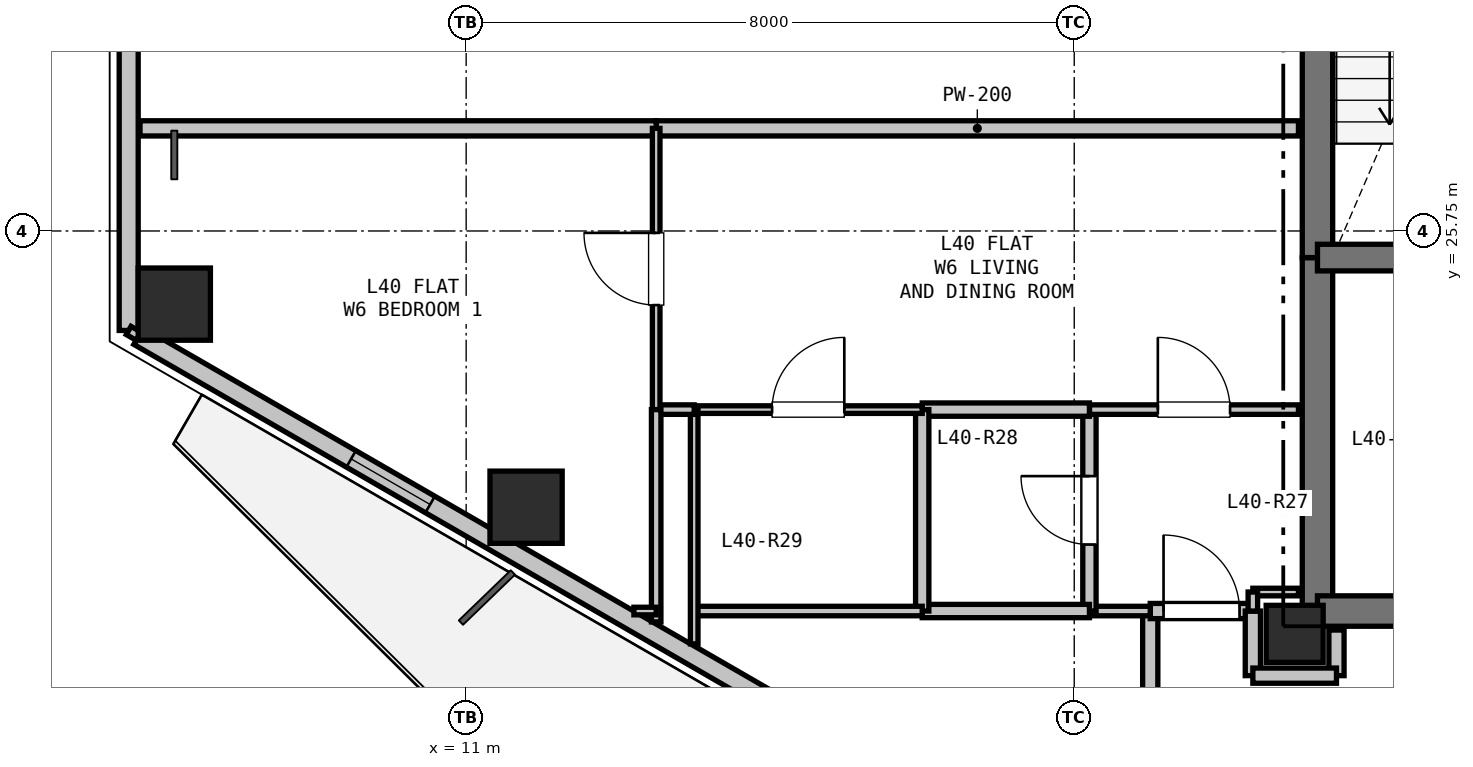
"""IFC4 building model, lengths in metres.
Left out: names, types, materials, properties, quantities, classifications, styles, units other than length and angle.
Written with IfcOpenShell. Run it as: python <this file> out.ifc"""

import sys

from ifc_helpers import new_model, si_unit, direction, frame, frame_2d, origin, origin_2d, place, context, subcontext, project, spatial, rectangle, hollow_rectangle, extrude, element, fill, save


model = new_model("IFC4")
c1 = context("Model", 3, precision=1e-05, world=origin(), true_north=direction((0.0, 1.0)))
c2 = subcontext(c1, "Body", "Model", "MODEL_VIEW")
j1 = project(units=[si_unit("LENGTHUNIT", "METRE"), si_unit("PLANEANGLEUNIT", "RADIAN")], contexts=[c1])
p1 = place(None, origin())
s1 = spatial("IfcSite", under=j1, at=p1, CompositionType="ELEMENT")
p2 = place(p1, origin())
s2 = spatial("IfcBuilding", under=s1, at=p2, CompositionType="ELEMENT")
p3 = place(p2, frame((0.0, 0.0, 144.3)))
s3 = spatial("IfcBuildingStorey", under=s2, at=p3, CompositionType="ELEMENT", Elevation=144.3)
p4 = place(p3, frame((21.9, 20.45, 0.0), z_axis=(0.0, 0.0, 1.0), x_axis=(1.0, 0.0, 0.0)))
e1 = element("IfcColumn", 1, at=p4, inside=s3, PredefinedType="COLUMN", context=c2, shape_type="SweptSolid", body=[
    extrude(rectangle(XDim=0.75, YDim=0.75, at=origin_2d()), origin(), (0.0, 0.0, 1.0), 3.3),
])
for number, where, z_axis, x_axis in (
    (2, (11.788, 22.116, 0.0), (0.0, 0.0, 1.0), (1.0, 0.0, 0.0)),
    (3, (7.16, 24.788, 0.0), (0.0, 0.0, 1.0), (1.0, 0.0, 0.0)),
):
    element("IfcColumn", number, at=place(p3, frame(where, z_axis=z_axis, x_axis=x_axis)), inside=s3, PredefinedType="COLUMN", context=c2, shape_type="SweptSolid", body=[
        extrude(hollow_rectangle(XDim=0.95, YDim=0.95, WallThickness=0.028, at=origin_2d()), origin(), (0.0, 0.0, 1.0), 3.3),
    ])
p5 = place(p3, frame((6.56, 24.441, 0.0), z_axis=(0.0, 0.0, 1.0), x_axis=(0.0, 1.0, 0.0)))
e4 = element("IfcWall", 4, at=p5, inside=s3, PredefinedType="SOLIDWALL", context=c2, shape_type="SweptSolid", body=[
    extrude(rectangle(XDim=4.617, YDim=0.25, at=frame_2d((2.309, 0.0))), origin(), (0.0, 0.0, 1.0), 2.68),
])
p6 = place(p3, frame((16.378, 18.773, 0.0), z_axis=(0.0, 0.0, 1.0), x_axis=(-0.866027848477, 0.499995765644, 0.0)))
e5 = element("IfcWall", 5, at=p6, inside=s3, PredefinedType="SOLIDWALL", context=c2, shape_type="SweptSolid", body=[
    extrude(rectangle(XDim=11.186, YDim=0.25, at=frame_2d((5.593, 0.0))), origin(), (0.0, 0.0, 1.0), 2.68),
])
p7 = place(p6, frame((6.757, 0.0, 0.9)))
e6 = element("IfcOpeningElement", 6, at=p7, cuts=e5, PredefinedType="OPENING", context=c2, shape_type="SweptSolid", body=[
    extrude(rectangle(XDim=1.2, YDim=1.4, at=frame_2d((0.6, 0.7))), frame((0.0, 0.135, 0.0), z_axis=(0.0, -1.0, 0.0), x_axis=(1.0, 0.0, 0.0)), (0.0, 0.0, 1.0), 0.27),
])
p8 = place(p3, frame((22.2, 20.75, 0.0), z_axis=(0.0, 0.0, 1.0), x_axis=(0.0, 1.0, 0.0)))
e7 = element("IfcWall", 7, at=p8, inside=s3, PredefinedType="SHEAR", context=c2, shape_type="SweptSolid", body=[
    extrude(rectangle(XDim=4.65, YDim=0.4, at=frame_2d((2.325, 0.0))), origin(), (0.0, 0.0, 1.0), 3.06),
])
p9 = place(p3, frame((22.2, 25.4, 0.0), z_axis=(0.0, 0.0, 1.0), x_axis=(0.0, 1.0, 0.0)))
e8 = element("IfcWall", 8, at=p9, inside=s3, PredefinedType="SHEAR", context=c2, shape_type="SweptSolid", body=[
    extrude(rectangle(XDim=7.35, YDim=0.4, at=frame_2d((3.675, 0.0))), origin(), (0.0, 0.0, 1.0), 3.06),
])
p10 = place(p3, frame((25.65, 20.75, 0.0), z_axis=(0.0, 0.0, 1.0), x_axis=(-1.0, 0.0, 0.0)))
e9 = element("IfcWall", 9, at=p10, inside=s3, PredefinedType="SHEAR", context=c2, shape_type="SweptSolid", body=[
    extrude(rectangle(XDim=3.45, YDim=0.4, at=frame_2d((1.725, 0.0))), origin(), (0.0, 0.0, 1.0), 3.06),
])
p11 = place(p10, frame((0.65, 0.0, 0.0)))
e10 = element("IfcOpeningElement", 10, at=p11, cuts=e9, PredefinedType="OPENING", context=c2, shape_type="SweptSolid", body=[
    extrude(rectangle(XDim=1.15, YDim=2.15, at=frame_2d((0.575, 1.075))), frame((0.0, 0.21, 0.0), z_axis=(0.0, -1.0, 0.0), x_axis=(1.0, 0.0, 0.0)), (0.0, 0.0, 1.0), 0.42),
])
p12 = place(p3, frame((22.2, 25.4, 0.0), z_axis=(0.0, 0.0, 1.0), x_axis=(1.0, 0.0, 0.0)))
e11 = element("IfcWall", 11, at=p12, inside=s3, PredefinedType="SHEAR", context=c2, shape_type="SweptSolid", body=[
    extrude(rectangle(XDim=3.45, YDim=0.35, at=frame_2d((1.725, 0.0))), origin(), (0.0, 0.0, 1.0), 3.06),
])
p13 = place(p12, frame((1.15, 0.0, 0.0)))
e12 = element("IfcOpeningElement", 12, at=p13, cuts=e11, PredefinedType="OPENING", context=c2, shape_type="SweptSolid", body=[
    extrude(rectangle(XDim=1.15, YDim=2.15, at=frame_2d((0.575, 1.075))), frame((0.0, 0.185, 0.0), z_axis=(0.0, -1.0, 0.0), x_axis=(1.0, 0.0, 0.0)), (0.0, 0.0, 1.0), 0.37),
])
p14 = place(p3, frame((22.45, 19.9, 0.0), z_axis=(0.0, 0.0, 1.0), x_axis=(0.0, 1.0, 0.0)))
e13 = element("IfcWall", 13, at=p14, inside=s3, PredefinedType="PARTITIONING", context=c2, shape_type="SweptSolid", body=[
    extrude(rectangle(XDim=0.6, YDim=0.2, at=frame_2d((0.3, 0.0))), origin(), (0.0, 0.0, 1.0), 2.433),
])
p15 = place(p3, frame((20.0, 18.15, 0.0), z_axis=(0.0, 0.0, 1.0), x_axis=(0.0, 1.0, 0.0)))
e14 = element("IfcWall", 14, at=p15, inside=s3, PredefinedType="PARTITIONING", context=c2, shape_type="SweptSolid", body=[
    extrude(rectangle(XDim=2.6, YDim=0.2, at=frame_2d((1.3, 0.0))), origin(), (0.0, 0.0, 1.0), 3.06),
])
p16 = place(p3, frame((20.0, 20.75, 0.0), z_axis=(0.0, 0.0, 1.0), x_axis=(1.0, 0.0, 0.0)))
e15 = element("IfcWall", 15, at=p16, inside=s3, PredefinedType="PARTITIONING", context=c2, shape_type="SweptSolid", body=[
    extrude(rectangle(XDim=1.35, YDim=0.2, at=frame_2d((0.675, 0.0))), origin(), (0.0, 0.0, 1.0), 2.433),
])
p17 = place(p16, frame((0.175, 0.0, 0.0)))
e16 = element("IfcOpeningElement", 16, at=p17, cuts=e15, PredefinedType="OPENING", context=c2, shape_type="SweptSolid", body=[
    extrude(rectangle(XDim=1.0, YDim=2.15, at=frame_2d((0.5, 1.075))), frame((0.0, 0.11, 0.0), z_axis=(0.0, -1.0, 0.0), x_axis=(1.0, 0.0, 0.0)), (0.0, 0.0, 1.0), 0.22),
])
p18 = place(p3, frame((21.35, 20.75, 0.0), z_axis=(0.0, 0.0, 1.0), x_axis=(0.0, -1.0, 0.0)))
e17 = element("IfcWall", 17, at=p18, inside=s3, PredefinedType="PARTITIONING", context=c2, shape_type="SweptSolid", body=[
    extrude(rectangle(XDim=0.85, YDim=0.2, at=frame_2d((0.425, 0.0))), origin(), (0.0, 0.0, 1.0), 2.433),
])
p19 = place(p3, frame((21.35, 19.9, 0.0), z_axis=(0.0, 0.0, 1.0), x_axis=(1.0, 0.0, 0.0)))
e18 = element("IfcWall", 18, at=p19, inside=s3, PredefinedType="PARTITIONING", context=c2, shape_type="SweptSolid", body=[
    extrude(rectangle(XDim=1.1, YDim=0.2, at=frame_2d((0.55, 0.0))), origin(), (0.0, 0.0, 1.0), 2.433),
])
p20 = place(p3, frame((20.0, 20.75, 0.0), z_axis=(0.0, 0.0, 1.0), x_axis=(-1.0, 0.0, 0.0)))
e19 = element("IfcWall", 19, at=p20, inside=s3, PredefinedType="PARTITIONING", context=c2, shape_type="SweptSolid", body=[
    extrude(rectangle(XDim=0.8, YDim=0.125, at=frame_2d((0.4, 0.0))), origin(), (0.0, 0.0, 1.0), 3.06),
])
p21 = place(p3, frame((19.2, 20.75, 0.0), z_axis=(0.0, 0.0, 1.0), x_axis=(0.0, 1.0, 0.0)))
e20 = element("IfcWall", 20, at=p21, inside=s3, PredefinedType="PLUMBINGWALL", context=c2, shape_type="SweptSolid", body=[
    extrude(rectangle(XDim=2.65, YDim=0.175, at=frame_2d((1.325, 0.0))), origin(), (0.0, 0.0, 1.0), 2.433),
])
p22 = place(p21, frame((0.875, 0.0, 0.0)))
e21 = element("IfcOpeningElement", 21, at=p22, cuts=e20, PredefinedType="OPENING", context=c2, shape_type="SweptSolid", body=[
    extrude(rectangle(XDim=0.9, YDim=2.1, at=frame_2d((0.45, 1.05))), frame((0.0, 0.097, 0.0), z_axis=(0.0, -1.0, 0.0), x_axis=(1.0, 0.0, 0.0)), (0.0, 0.0, 1.0), 0.195),
])
p23 = place(p3, frame((19.2, 23.4, 0.0), z_axis=(0.0, 0.0, 1.0), x_axis=(1.0, 0.0, 0.0)))
e22 = element("IfcWall", 22, at=p23, inside=s3, PredefinedType="PARTITIONING", context=c2, shape_type="SweptSolid", body=[
    extrude(rectangle(XDim=2.75, YDim=0.125, at=frame_2d((1.375, 0.0))), origin(), (0.0, 0.0, 1.0), 2.585),
])
p24 = place(p23, frame((0.9, 0.0, 0.0)))
e23 = element("IfcOpeningElement", 23, at=p24, cuts=e22, PredefinedType="OPENING", context=c2, shape_type="SweptSolid", body=[
    extrude(rectangle(XDim=0.95, YDim=2.1, at=frame_2d((0.475, 1.05))), frame((0.0, 0.073, 0.0), z_axis=(0.0, -1.0, 0.0), x_axis=(1.0, 0.0, 0.0)), (0.0, 0.0, 1.0), 0.145),
])
p25 = place(p3, frame((21.95, 21.0, 0.0), z_axis=(0.0, 0.0, 1.0), x_axis=(-1.0, 0.0, 0.0)))
e24 = element("IfcWall", 24, at=p25, inside=s3, PredefinedType="PARTITIONING", context=c2, shape_type="SweptSolid", body=[
    extrude(rectangle(XDim=0.6, YDim=0.1, at=frame_2d((0.3, 0.0))), origin(), (0.0, 0.0, 1.0), 2.585),
])
p26 = place(p3, frame((21.35, 21.0, 0.0), z_axis=(0.0, 0.0, 1.0), x_axis=(0.0, -1.0, 0.0)))
e25 = element("IfcWall", 25, at=p26, inside=s3, PredefinedType="PARTITIONING", context=c2, shape_type="SweptSolid", body=[
    extrude(rectangle(XDim=0.25, YDim=0.125, at=frame_2d((0.125, 0.0))), origin(), (0.0, 0.0, 1.0), 3.06),
])
for number, where, z_axis, x_axis in (
    (26, (17.0, 23.4, 0.0), (0.0, 0.0, 1.0), (1.0, 0.0, 0.0)),
    (27, (19.2, 20.75, 0.0), (0.0, 0.0, 1.0), (-1.0, 0.0, 0.0)),
):
    element("IfcWall", number, at=place(p3, frame(where, z_axis=z_axis, x_axis=x_axis)), inside=s3, PredefinedType="PLUMBINGWALL", context=c2, shape_type="SweptSolid", body=[
        extrude(rectangle(XDim=2.2, YDim=0.175, at=frame_2d((1.1, 0.0))), origin(), (0.0, 0.0, 1.0), 3.06),
    ])
p27 = place(p3, frame((17.0, 20.75, 0.0), z_axis=(0.0, 0.0, 1.0), x_axis=(0.0, 1.0, 0.0)))
e28 = element("IfcWall", 28, at=p27, inside=s3, PredefinedType="PLUMBINGWALL", context=c2, shape_type="SweptSolid", body=[
    extrude(rectangle(XDim=2.65, YDim=0.175, at=frame_2d((1.325, 0.0))), origin(), (0.0, 0.0, 1.0), 2.433),
])
p28 = place(p3, frame((14.0, 23.4, 0.0), z_axis=(0.0, 0.0, 1.0), x_axis=(1.0, 0.0, 0.0)))
e29 = element("IfcWall", 29, at=p28, inside=s3, PredefinedType="PARTITIONING", context=c2, shape_type="SweptSolid", body=[
    extrude(rectangle(XDim=3.0, YDim=0.1, at=frame_2d((1.5, 0.0))), origin(), (0.0, 0.0, 1.0), 3.06),
])
p29 = place(p28, frame((1.025, 0.0, 0.0)))
e30 = element("IfcOpeningElement", 30, at=p29, cuts=e29, PredefinedType="OPENING", context=c2, shape_type="SweptSolid", body=[
    extrude(rectangle(XDim=0.95, YDim=2.1, at=frame_2d((0.475, 1.05))), frame((0.0, 0.06, 0.0), z_axis=(0.0, -1.0, 0.0), x_axis=(1.0, 0.0, 0.0)), (0.0, 0.0, 1.0), 0.12),
])
p30 = place(p3, frame((17.0, 20.75, 0.0), z_axis=(0.0, 0.0, 1.0), x_axis=(-1.0, 0.0, 0.0)))
e31 = element("IfcWall", 31, at=p30, inside=s3, PredefinedType="PARTITIONING", context=c2, shape_type="SweptSolid", body=[
    extrude(rectangle(XDim=3.0, YDim=0.125, at=frame_2d((1.5, 0.0))), origin(), (0.0, 0.0, 1.0), 2.365),
])
p31 = place(p3, frame((14.0, 20.318, 0.0), z_axis=(0.0, 0.0, 1.0), x_axis=(0.0, 1.0, 0.0)))
e32 = element("IfcWall", 32, at=p31, inside=s3, PredefinedType="PARTITIONING", context=c2, shape_type="SweptSolid", body=[
    extrude(rectangle(XDim=3.082, YDim=0.1, at=frame_2d((1.541, 0.0))), origin(), (0.0, 0.0, 1.0), 2.365),
])
p32 = place(p3, frame((21.95, 27.1, 0.0), z_axis=(0.0, 0.0, 1.0), x_axis=(-1.0, 0.0, 0.0)))
e33 = element("IfcWall", 33, at=p32, inside=s3, PredefinedType="PARTITIONING", context=c2, shape_type="SweptSolid", body=[
    extrude(rectangle(XDim=8.45, YDim=0.2, at=frame_2d((4.225, 0.0))), origin(), (0.0, 0.0, 1.0), 2.585),
])
p33 = place(p3, frame((13.5, 27.1, 0.0), z_axis=(0.0, 0.0, 1.0), x_axis=(-1.0, 0.0, 0.0)))
e34 = element("IfcWall", 34, at=p33, inside=s3, PredefinedType="PARTITIONING", context=c2, shape_type="SweptSolid", body=[
    extrude(rectangle(XDim=6.791, YDim=0.2, at=frame_2d((3.396, 0.0))), origin(), (0.0, 0.0, 1.0), 2.724),
])
p34 = place(p3, frame((14.0, 23.4, 0.0), z_axis=(0.0, 0.0, 1.0), x_axis=(-1.0, 0.0, 0.0)))
e35 = element("IfcWall", 35, at=p34, inside=s3, PredefinedType="PARTITIONING", context=c2, shape_type="SweptSolid", body=[
    extrude(rectangle(XDim=0.5, YDim=0.125, at=frame_2d((0.25, 0.0))), origin(), (0.0, 0.0, 1.0), 3.06),
])
p35 = place(p3, frame((13.5, 23.4, 0.0), z_axis=(0.0, 0.0, 1.0), x_axis=(0.0, 1.0, 0.0)))
e36 = element("IfcWall", 36, at=p35, inside=s3, PredefinedType="PARTITIONING", context=c2, shape_type="SweptSolid", body=[
    extrude(rectangle(XDim=3.7, YDim=0.1, at=frame_2d((1.85, 0.0))), origin(), (0.0, 0.0, 1.0), 3.06),
])
p36 = place(p35, frame((1.375, 0.0, 0.0)))
e37 = element("IfcOpeningElement", 37, at=p36, cuts=e36, PredefinedType="OPENING", context=c2, shape_type="SweptSolid", body=[
    extrude(rectangle(XDim=0.95, YDim=2.1, at=frame_2d((0.475, 1.05))), frame((0.0, 0.06, 0.0), z_axis=(0.0, -1.0, 0.0), x_axis=(1.0, 0.0, 0.0)), (0.0, 0.0, 1.0), 0.12),
])
p37 = place(p3, frame((13.5, 23.4, 0.0), z_axis=(0.0, 0.0, 1.0), x_axis=(0.0, -1.0, 0.0)))
e38 = element("IfcWall", 38, at=p37, inside=s3, PredefinedType="PARTITIONING", context=c2, shape_type="SweptSolid", body=[
    extrude(rectangle(XDim=2.793, YDim=0.125, at=frame_2d((1.396, 0.0))), origin(), (0.0, 0.0, 1.0), 2.365),
])
p38 = place(p3, frame((13.5, 20.75, 0.0), z_axis=(0.0, 0.0, 1.0), x_axis=(-1.0, 0.0, 0.0)))
e39 = element("IfcWall", 39, at=p38, inside=s3, PredefinedType="PARTITIONING", context=c2, shape_type="SweptSolid", body=[
    extrude(rectangle(XDim=0.293, YDim=0.1, at=frame_2d((0.146, 0.0))), origin(), (0.0, 0.0, 1.0), 3.06),
])
p39 = place(p3, frame((6.69, 24.366, 0.0), z_axis=(0.0, 0.0, 1.0), x_axis=(-0.866131372301, 0.499816412211, 0.0)))
e40 = element("IfcWall", 40, at=p39, inside=s3, PredefinedType="PARTITIONING", context=c2, shape_type="SweptSolid", body=[
    extrude(rectangle(XDim=0.15, YDim=0.125, at=frame_2d((0.075, 0.0))), origin(), (0.0, 0.0, 1.0), 3.06),
])
p40 = place(p7, origin())
e41 = element("IfcWindow", 41, at=p40, inside=s3, PartitioningType="SINGLE_PANEL", PredefinedType="WINDOW", context=c2, shape_type="SweptSolid", body=[
    extrude(rectangle(XDim=1.2, YDim=1.4, at=frame_2d((0.6, 0.7))), frame((0.0, 0.03, 0.0), z_axis=(0.0, -1.0, 0.0), x_axis=(1.0, 0.0, 0.0)), (0.0, 0.0, 1.0), 0.06),
])
fill(e6, e41)
p41 = place(p17, origin())
e42 = element("IfcDoor", 42, at=p41, inside=s3, OperationType="SINGLE_SWING_LEFT", PredefinedType="DOOR", context=c2, shape_type="SweptSolid", body=[
    extrude(rectangle(XDim=1.0, YDim=2.15, at=frame_2d((0.5, 1.075))), frame((0.0, 0.025, 0.0), z_axis=(0.0, -1.0, 0.0), x_axis=(1.0, 0.0, 0.0)), (0.0, 0.0, 1.0), 0.05),
])
fill(e16, e42)
p42 = place(p22, origin())
e43 = element("IfcDoor", 43, at=p42, inside=s3, OperationType="SINGLE_SWING_RIGHT", PredefinedType="DOOR", context=c2, shape_type="SweptSolid", body=[
    extrude(rectangle(XDim=0.9, YDim=2.1, at=frame_2d((0.45, 1.05))), frame((0.0, 0.025, 0.0), z_axis=(0.0, -1.0, 0.0), x_axis=(1.0, 0.0, 0.0)), (0.0, 0.0, 1.0), 0.05),
])
fill(e21, e43)
p43 = place(p24, origin())
e44 = element("IfcDoor", 44, at=p43, inside=s3, OperationType="SINGLE_SWING_LEFT", PredefinedType="DOOR", context=c2, shape_type="SweptSolid", body=[
    extrude(rectangle(XDim=0.95, YDim=2.1, at=frame_2d((0.475, 1.05))), frame((0.0, 0.025, 0.0), z_axis=(0.0, -1.0, 0.0), x_axis=(1.0, 0.0, 0.0)), (0.0, 0.0, 1.0), 0.05),
])
fill(e23, e44)
p44 = place(p29, origin())
e45 = element("IfcDoor", 45, at=p44, inside=s3, OperationType="SINGLE_SWING_RIGHT", PredefinedType="DOOR", context=c2, shape_type="SweptSolid", body=[
    extrude(rectangle(XDim=0.95, YDim=2.1, at=frame_2d((0.475, 1.05))), frame((0.0, 0.025, 0.0), z_axis=(0.0, -1.0, 0.0), x_axis=(1.0, 0.0, 0.0)), (0.0, 0.0, 1.0), 0.05),
])
fill(e30, e45)
p45 = place(p36, origin())
e46 = element("IfcDoor", 46, at=p45, inside=s3, OperationType="SINGLE_SWING_RIGHT", PredefinedType="DOOR", context=c2, shape_type="SweptSolid", body=[
    extrude(rectangle(XDim=0.95, YDim=2.1, at=frame_2d((0.475, 1.05))), frame((0.0, 0.025, 0.0), z_axis=(0.0, -1.0, 0.0), x_axis=(1.0, 0.0, 0.0)), (0.0, 0.0, 1.0), 0.05),
])
fill(e37, e46)
save(model, sys.argv[1])
